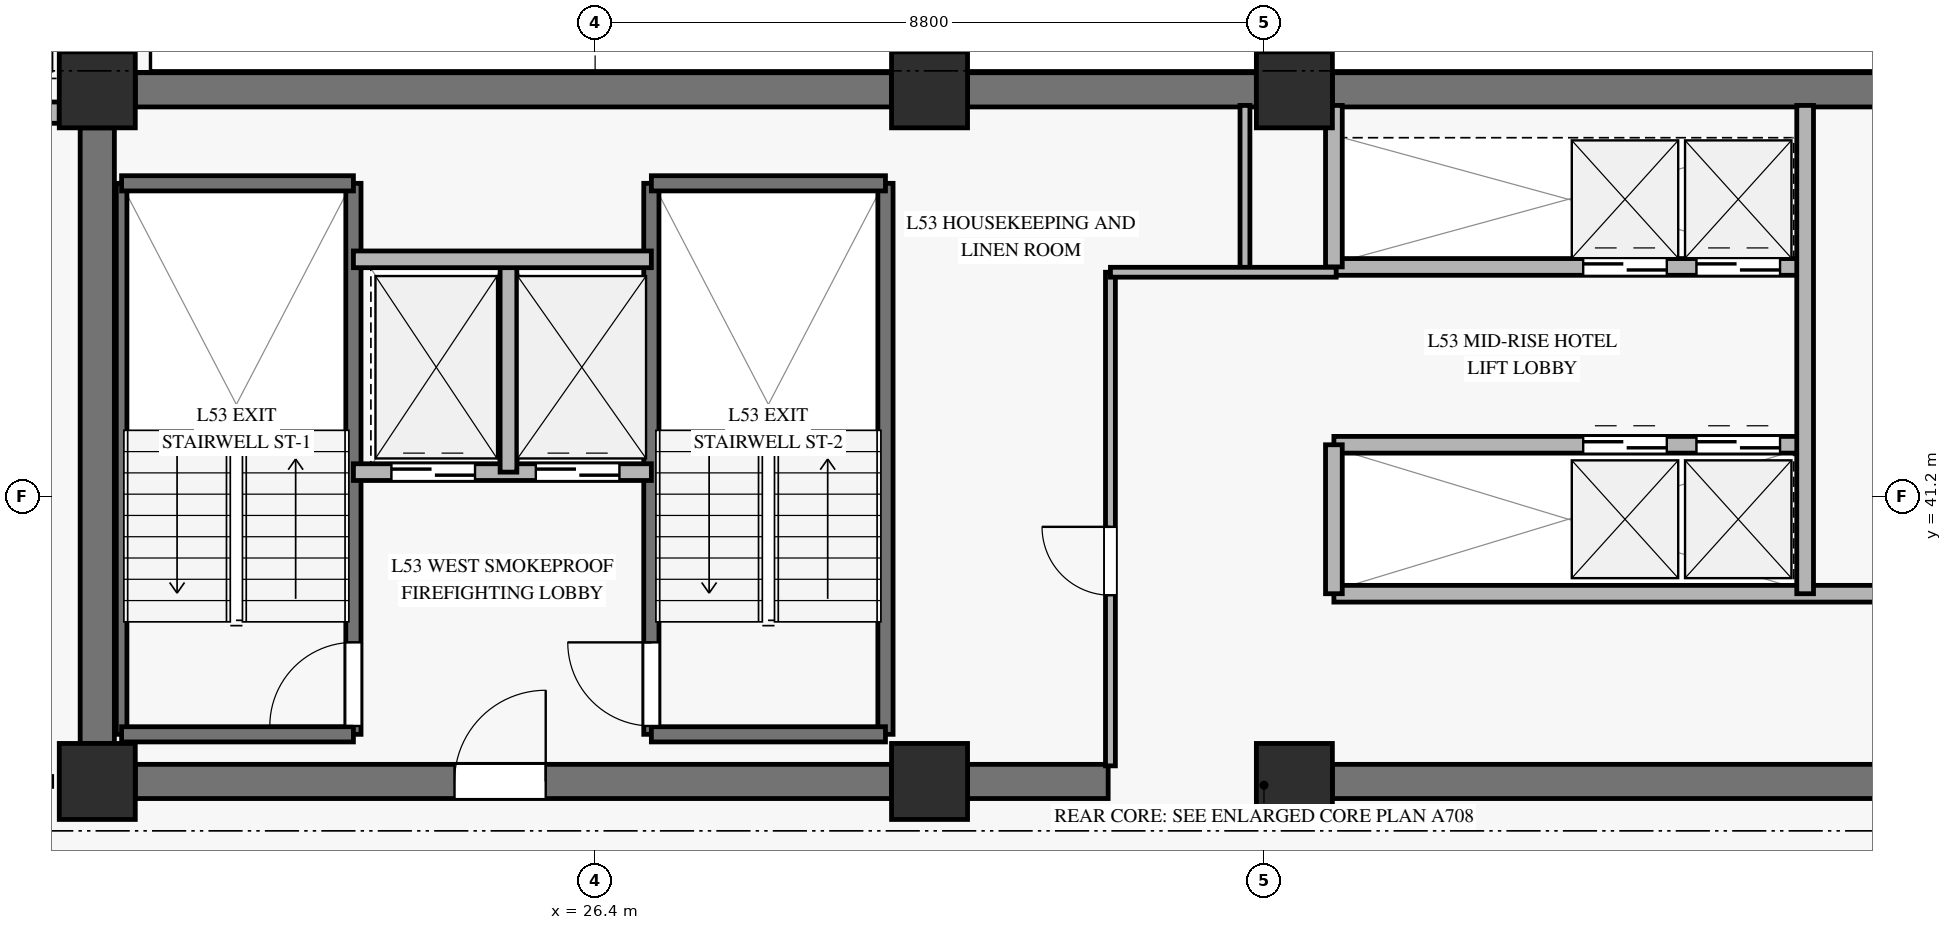
"""IFC4 building model, lengths in metres.
Left out: names, types, materials, properties, quantities, classifications, styles, units other than length and angle.
Written with IfcOpenShell. Run it as: python <this file> out.ifc"""

import sys

from ifc_helpers import new_model, si_unit, direction, frame, frame_2d, origin, origin_2d, place, context, subcontext, project, spatial, rectangle, extrude, source, transform, mapped, element, fill, save


model = new_model("IFC4")
c1 = context("Model", 3, precision=1e-05, world=origin(), true_north=direction((0.0, 1.0)))
c2 = subcontext(c1, "Body", "Model", "MODEL_VIEW")
j1 = project(units=[si_unit("LENGTHUNIT", "METRE"), si_unit("PLANEANGLEUNIT", "RADIAN")], contexts=[c1])
p1 = place(None, origin())
s1 = spatial("IfcSite", under=j1, at=p1, CompositionType="ELEMENT")
p2 = place(p1, origin())
s2 = spatial("IfcBuilding", under=s1, at=p2, CompositionType="ELEMENT")
p3 = place(p2, frame((0.0, 0.0, 209.7)))
s3 = spatial("IfcBuildingStorey", under=s2, at=p3, CompositionType="ELEMENT", Elevation=209.7)
m1 = source(origin(), c2, "Body", "SweptSolid", [
    extrude(rectangle(XDim=1.0, YDim=1.0, at=origin_2d()), origin(), (0.0, 0.0, 1.0), 3.27),
])
for number, where, z_axis, x_axis in (
    (1, (19.85, 37.45, 0.0), (0.0, 0.0, 1.0), (1.0, 0.0, 0.0)),
    (2, (19.85, 46.55, 0.0), (0.0, 0.0, 1.0), (1.0, 0.0, 0.0)),
    (3, (30.8, 37.45, 0.0), (0.0, 0.0, 1.0), (1.0, 0.0, 0.0)),
    (4, (30.8, 46.55, 0.0), (0.0, 0.0, 1.0), (1.0, 0.0, 0.0)),
    (5, (35.6, 37.45, 0.0), (0.0, 0.0, 1.0), (1.0, 0.0, 0.0)),
    (6, (35.6, 46.55, 0.0), (0.0, 0.0, 1.0), (1.0, 0.0, 0.0)),
):
    element("IfcColumn", number, at=place(p3, frame(where, z_axis=z_axis, x_axis=x_axis)), inside=s3, PredefinedType="PILASTER", context=c2, shape_type="MappedRepresentation", body=[
        mapped(m1, transform((0.0, 0.0, 0.0), x_axis=(1.0, 0.0, 0.0), y_axis=(0.0, 1.0, 0.0), z_axis=(0.0, 0.0, 1.0), scale=1.0)),
    ])
p4 = place(p3, frame((20.35, 46.55, 0.0), z_axis=(0.0, 0.0, 1.0), x_axis=(1.0, 0.0, 0.0)))
e7 = element("IfcWall", 7, at=p4, inside=s3, PredefinedType="SHEAR", context=c2, shape_type="SweptSolid", body=[
    extrude(rectangle(XDim=9.95, YDim=0.45, at=frame_2d((4.975, 0.0))), origin(), (0.0, 0.0, 1.0), 3.27),
])
p5 = place(p3, frame((31.3, 46.55, 0.0), z_axis=(0.0, 0.0, 1.0), x_axis=(1.0, 0.0, 0.0)))
e8 = element("IfcWall", 8, at=p5, inside=s3, PredefinedType="SHEAR", context=c2, shape_type="SweptSolid", body=[
    extrude(rectangle(XDim=3.8, YDim=0.45, at=frame_2d((1.9, 0.0))), origin(), (0.0, 0.0, 1.0), 3.27),
])
p6 = place(p3, frame((36.1, 46.55, 0.0), z_axis=(0.0, 0.0, 1.0), x_axis=(1.0, 0.0, 0.0)))
e9 = element("IfcWall", 9, at=p6, inside=s3, PredefinedType="SHEAR", context=c2, shape_type="SweptSolid", body=[
    extrude(rectangle(XDim=7.7, YDim=0.45, at=frame_2d((3.85, 0.0))), origin(), (0.0, 0.0, 1.0), 3.27),
])
p7 = place(p3, frame((20.35, 37.45, 0.0), z_axis=(0.0, 0.0, 1.0), x_axis=(1.0, 0.0, 0.0)))
e10 = element("IfcWall", 10, at=p7, inside=s3, PredefinedType="SHEAR", context=c2, shape_type="SweptSolid", body=[
    extrude(rectangle(XDim=9.95, YDim=0.45, at=frame_2d((4.975, 0.0))), origin(), (0.0, 0.0, 1.0), 3.27),
])
p8 = place(p7, frame((4.2, 0.0, 0.0)))
e11 = element("IfcOpeningElement", 11, at=p8, cuts=e10, PredefinedType="OPENING", context=c2, shape_type="SweptSolid", body=[
    extrude(rectangle(XDim=1.2, YDim=2.15, at=frame_2d((0.6, 1.075))), frame((0.0, 0.235, 0.0), z_axis=(0.0, -1.0, 0.0), x_axis=(1.0, 0.0, 0.0)), (0.0, 0.0, 1.0), 0.47),
])
p9 = place(p3, frame((31.3, 37.45, 0.0), z_axis=(0.0, 0.0, 1.0), x_axis=(1.0, 0.0, 0.0)))
e12 = element("IfcWall", 12, at=p9, inside=s3, PredefinedType="SHEAR", context=c2, shape_type="SweptSolid", body=[
    extrude(rectangle(XDim=1.85, YDim=0.45, at=frame_2d((0.925, 0.0))), origin(), (0.0, 0.0, 1.0), 3.27),
])
p10 = place(p3, frame((36.1, 37.45, 0.0), z_axis=(0.0, 0.0, 1.0), x_axis=(1.0, 0.0, 0.0)))
e13 = element("IfcWall", 13, at=p10, inside=s3, PredefinedType="SHEAR", context=c2, shape_type="SweptSolid", body=[
    extrude(rectangle(XDim=7.7, YDim=0.45, at=frame_2d((3.85, 0.0))), origin(), (0.0, 0.0, 1.0), 3.27),
])
p11 = place(p3, frame((19.85, 37.95, 0.0), z_axis=(0.0, 0.0, 1.0), x_axis=(0.0, 1.0, 0.0)))
e14 = element("IfcWall", 14, at=p11, inside=s3, PredefinedType="SHEAR", context=c2, shape_type="SweptSolid", body=[
    extrude(rectangle(XDim=8.1, YDim=0.45, at=frame_2d((4.05, 0.0))), origin(), (0.0, 0.0, 1.0), 3.27),
])
p12 = place(p3, frame((9.803, 46.25, 0.0), z_axis=(0.0, 0.0, 1.0), x_axis=(1.0, 0.0, 0.0)))
e15 = element("IfcWall", 15, at=p12, inside=s3, PredefinedType="SOLIDWALL", context=c2, shape_type="SweptSolid", body=[
    extrude(rectangle(XDim=9.547, YDim=0.28, at=frame_2d((4.773, 0.0))), origin(), (0.0, 0.0, 1.0), 2.75),
])
p13 = place(p12, frame((3.974, 0.0, 0.45)))
e16 = element("IfcOpeningElement", 16, at=p13, cuts=e15, PredefinedType="OPENING", context=c2, shape_type="SweptSolid", body=[
    extrude(rectangle(XDim=1.6, YDim=2.0, at=frame_2d((0.8, 1.0))), frame((0.0, 0.15, 0.0), z_axis=(0.0, -1.0, 0.0), x_axis=(1.0, 0.0, 0.0)), (0.0, 0.0, 1.0), 0.3),
])
p14 = place(p3, frame((20.17, 38.07, 0.0), z_axis=(0.0, 0.0, 1.0), x_axis=(0.0, 1.0, 0.0)))
e17 = element("IfcWall", 17, at=p14, inside=s3, PredefinedType="SOLIDWALL", context=c2, shape_type="SweptSolid", body=[
    extrude(rectangle(XDim=7.25, YDim=0.14, at=frame_2d((3.625, 0.0))), origin(), (0.0, 0.0, 1.0), 3.5),
])
p15 = place(p3, frame((23.22, 38.07, 0.0), z_axis=(0.0, 0.0, 1.0), x_axis=(0.0, 1.0, 0.0)))
e18 = element("IfcWall", 18, at=p15, inside=s3, PredefinedType="SOLIDWALL", context=c2, shape_type="SweptSolid", body=[
    extrude(rectangle(XDim=7.25, YDim=0.2, at=frame_2d((3.625, 0.0))), origin(), (0.0, 0.0, 1.0), 3.5),
])
p16 = place(p15, frame((0.11, 0.0, 0.0)))
e19 = element("IfcOpeningElement", 19, at=p16, cuts=e18, PredefinedType="OPENING", context=c2, shape_type="SweptSolid", body=[
    extrude(rectangle(XDim=1.1, YDim=2.15, at=frame_2d((0.55, 1.075))), frame((0.0, 0.11, 0.0), z_axis=(0.0, -1.0, 0.0), x_axis=(1.0, 0.0, 0.0)), (0.0, 0.0, 1.0), 0.22),
])
for number, where, z_axis, x_axis in (
    (20, (20.17, 45.32, 0.0), (0.0, 0.0, 1.0), (1.0, 0.0, 0.0)),
    (21, (20.17, 38.07, 0.0), (0.0, 0.0, 1.0), (1.0, 0.0, 0.0)),
):
    element("IfcWall", number, at=place(p3, frame(where, z_axis=z_axis, x_axis=x_axis)), inside=s3, PredefinedType="SOLIDWALL", context=c2, shape_type="SweptSolid", body=[
        extrude(rectangle(XDim=3.05, YDim=0.2, at=frame_2d((1.525, 0.0))), origin(), (0.0, 0.0, 1.0), 3.5),
    ])
p17 = place(p3, frame((27.14, 38.07, 0.0), z_axis=(0.0, 0.0, 1.0), x_axis=(0.0, 1.0, 0.0)))
e22 = element("IfcWall", 22, at=p17, inside=s3, PredefinedType="SOLIDWALL", context=c2, shape_type="SweptSolid", body=[
    extrude(rectangle(XDim=7.25, YDim=0.2, at=frame_2d((3.625, 0.0))), origin(), (0.0, 0.0, 1.0), 3.5),
])
p18 = place(p17, frame((0.11, 0.0, 0.0)))
e23 = element("IfcOpeningElement", 23, at=p18, cuts=e22, PredefinedType="OPENING", context=c2, shape_type="SweptSolid", body=[
    extrude(rectangle(XDim=1.1, YDim=2.15, at=frame_2d((0.55, 1.075))), frame((0.0, 0.11, 0.0), z_axis=(0.0, -1.0, 0.0), x_axis=(1.0, 0.0, 0.0)), (0.0, 0.0, 1.0), 0.22),
])
p19 = place(p3, frame((30.22, 38.07, 0.0), z_axis=(0.0, 0.0, 1.0), x_axis=(0.0, 1.0, 0.0)))
e24 = element("IfcWall", 24, at=p19, inside=s3, PredefinedType="SOLIDWALL", context=c2, shape_type="SweptSolid", body=[
    extrude(rectangle(XDim=7.25, YDim=0.2, at=frame_2d((3.625, 0.0))), origin(), (0.0, 0.0, 1.0), 3.5),
])
for number, where, z_axis, x_axis in (
    (25, (27.14, 45.32, 0.0), (0.0, 0.0, 1.0), (1.0, 0.0, 0.0)),
    (26, (27.14, 38.07, 0.0), (0.0, 0.0, 1.0), (1.0, 0.0, 0.0)),
):
    element("IfcWall", number, at=place(p3, frame(where, z_axis=z_axis, x_axis=x_axis)), inside=s3, PredefinedType="SOLIDWALL", context=c2, shape_type="SweptSolid", body=[
        extrude(rectangle(XDim=3.08, YDim=0.2, at=frame_2d((1.54, 0.0))), origin(), (0.0, 0.0, 1.0), 3.5),
    ])
p20 = place(p3, frame((23.22, 41.52, 0.0), z_axis=(0.0, 0.0, 1.0), x_axis=(1.0, 0.0, 0.0)))
e27 = element("IfcWall", 27, at=p20, inside=s3, PredefinedType="SOLIDWALL", context=c2, shape_type="SweptSolid", body=[
    extrude(rectangle(XDim=3.92, YDim=0.22, at=frame_2d((1.96, 0.0))), origin(), (0.0, 0.0, 1.0), 3.27),
])
p21 = place(p20, frame((0.5, 0.0, 0.0)))
e28 = element("IfcOpeningElement", 28, at=p21, cuts=e27, PredefinedType="OPENING", context=c2, shape_type="SweptSolid", body=[
    extrude(rectangle(XDim=1.1, YDim=2.2, at=frame_2d((0.55, 1.1))), frame((0.0, 0.12, 0.0), z_axis=(0.0, -1.0, 0.0), x_axis=(1.0, 0.0, 0.0)), (0.0, 0.0, 1.0), 0.24),
])
p22 = place(p20, frame((2.4, 0.0, 0.0)))
e29 = element("IfcOpeningElement", 29, at=p22, cuts=e27, PredefinedType="OPENING", context=c2, shape_type="SweptSolid", body=[
    extrude(rectangle(XDim=1.1, YDim=2.2, at=frame_2d((0.55, 1.1))), frame((0.0, 0.12, 0.0), z_axis=(0.0, -1.0, 0.0), x_axis=(1.0, 0.0, 0.0)), (0.0, 0.0, 1.0), 0.24),
])
p23 = place(p3, frame((25.26, 41.52, 0.0), z_axis=(0.0, 0.0, 1.0), x_axis=(0.0, 1.0, 0.0)))
e30 = element("IfcWall", 30, at=p23, inside=s3, PredefinedType="SOLIDWALL", context=c2, shape_type="SweptSolid", body=[
    extrude(rectangle(XDim=2.8, YDim=0.22, at=frame_2d((1.4, 0.0))), origin(), (0.0, 0.0, 1.0), 3.27),
])
p24 = place(p3, frame((23.22, 44.32, 0.0), z_axis=(0.0, 0.0, 1.0), x_axis=(1.0, 0.0, 0.0)))
e31 = element("IfcWall", 31, at=p24, inside=s3, PredefinedType="SOLIDWALL", context=c2, shape_type="SweptSolid", body=[
    extrude(rectangle(XDim=3.92, YDim=0.22, at=frame_2d((1.96, 0.0))), origin(), (0.0, 0.0, 1.0), 3.27),
])
p25 = place(p3, frame((36.12, 44.22, 0.0), z_axis=(0.0, 0.0, 1.0), x_axis=(1.0, 0.0, 0.0)))
e32 = element("IfcWall", 32, at=p25, inside=s3, PredefinedType="SOLIDWALL", context=c2, shape_type="SweptSolid", body=[
    extrude(rectangle(XDim=6.2, YDim=0.22, at=frame_2d((3.1, 0.0))), origin(), (0.0, 0.0, 1.0), 3.27),
])
p26 = place(p25, frame((3.28, 0.0, 0.0)))
e33 = element("IfcOpeningElement", 33, at=p26, cuts=e32, PredefinedType="OPENING", context=c2, shape_type="SweptSolid", body=[
    extrude(rectangle(XDim=1.1, YDim=2.2, at=frame_2d((0.55, 1.1))), frame((0.0, 0.12, 0.0), z_axis=(0.0, -1.0, 0.0), x_axis=(1.0, 0.0, 0.0)), (0.0, 0.0, 1.0), 0.24),
])
p27 = place(p25, frame((4.77, 0.0, 0.0)))
e34 = element("IfcOpeningElement", 34, at=p27, cuts=e32, PredefinedType="OPENING", context=c2, shape_type="SweptSolid", body=[
    extrude(rectangle(XDim=1.1, YDim=2.2, at=frame_2d((0.55, 1.1))), frame((0.0, 0.12, 0.0), z_axis=(0.0, -1.0, 0.0), x_axis=(1.0, 0.0, 0.0)), (0.0, 0.0, 1.0), 0.24),
])
p28 = place(p3, frame((36.12, 41.88, 0.0), z_axis=(0.0, 0.0, 1.0), x_axis=(1.0, 0.0, 0.0)))
e35 = element("IfcWall", 35, at=p28, inside=s3, PredefinedType="SOLIDWALL", context=c2, shape_type="SweptSolid", body=[
    extrude(rectangle(XDim=6.2, YDim=0.22, at=frame_2d((3.1, 0.0))), origin(), (0.0, 0.0, 1.0), 3.27),
])
p29 = place(p28, frame((3.28, 0.0, 0.0)))
e36 = element("IfcOpeningElement", 36, at=p29, cuts=e35, PredefinedType="OPENING", context=c2, shape_type="SweptSolid", body=[
    extrude(rectangle(XDim=1.1, YDim=2.2, at=frame_2d((0.55, 1.1))), frame((0.0, 0.12, 0.0), z_axis=(0.0, -1.0, 0.0), x_axis=(1.0, 0.0, 0.0)), (0.0, 0.0, 1.0), 0.24),
])
p30 = place(p28, frame((4.77, 0.0, 0.0)))
e37 = element("IfcOpeningElement", 37, at=p30, cuts=e35, PredefinedType="OPENING", context=c2, shape_type="SweptSolid", body=[
    extrude(rectangle(XDim=1.1, YDim=2.2, at=frame_2d((0.55, 1.1))), frame((0.0, 0.12, 0.0), z_axis=(0.0, -1.0, 0.0), x_axis=(1.0, 0.0, 0.0)), (0.0, 0.0, 1.0), 0.24),
])
p31 = place(p3, frame((36.12, 39.92, 0.0), z_axis=(0.0, 0.0, 1.0), x_axis=(1.0, 0.0, 0.0)))
e38 = element("IfcWall", 38, at=p31, inside=s3, PredefinedType="SOLIDWALL", context=c2, shape_type="SweptSolid", body=[
    extrude(rectangle(XDim=8.6, YDim=0.22, at=frame_2d((4.3, 0.0))), origin(), (0.0, 0.0, 1.0), 2.555),
])
p32 = place(p3, frame((42.32, 39.92, 0.0), z_axis=(0.0, 0.0, 1.0), x_axis=(0.0, 1.0, 0.0)))
e39 = element("IfcWall", 39, at=p32, inside=s3, PredefinedType="SOLIDWALL", context=c2, shape_type="SweptSolid", body=[
    extrude(rectangle(XDim=6.425, YDim=0.22, at=frame_2d((3.212, 0.0))), origin(), (0.0, 0.0, 1.0), 3.27),
])
p33 = place(p3, frame((36.12, 39.92, 0.0), z_axis=(0.0, 0.0, 1.0), x_axis=(0.0, 1.0, 0.0)))
e40 = element("IfcWall", 40, at=p33, inside=s3, PredefinedType="SOLIDWALL", context=c2, shape_type="SweptSolid", body=[
    extrude(rectangle(XDim=1.96, YDim=0.22, at=frame_2d((0.98, 0.0))), origin(), (0.0, 0.0, 1.0), 3.27),
])
p34 = place(p3, frame((36.12, 44.22, 0.0), z_axis=(0.0, 0.0, 1.0), x_axis=(0.0, 1.0, 0.0)))
e41 = element("IfcWall", 41, at=p34, inside=s3, PredefinedType="SOLIDWALL", context=c2, shape_type="SweptSolid", body=[
    extrude(rectangle(XDim=2.125, YDim=0.22, at=frame_2d((1.062, 0.0))), origin(), (0.0, 0.0, 1.0), 3.27),
])
p35 = place(p3, frame((33.18, 37.655, 0.0), z_axis=(0.0, 0.0, 1.0), x_axis=(0.0, 1.0, 0.0)))
e42 = element("IfcWall", 42, at=p35, inside=s3, PredefinedType="PARTITIONING", context=c2, shape_type="SweptSolid", body=[
    extrude(rectangle(XDim=6.495, YDim=0.13, at=frame_2d((3.248, 0.0))), origin(), (0.0, 0.0, 1.0), 2.355),
])
p36 = place(p35, frame((2.245, 0.0, 0.0)))
e43 = element("IfcOpeningElement", 43, at=p36, cuts=e42, PredefinedType="OPENING", context=c2, shape_type="SweptSolid", body=[
    extrude(rectangle(XDim=0.9, YDim=2.1, at=frame_2d((0.45, 1.05))), frame((0.0, 0.075, 0.0), z_axis=(0.0, -1.0, 0.0), x_axis=(1.0, 0.0, 0.0)), (0.0, 0.0, 1.0), 0.15),
])
p37 = place(p3, frame((34.95, 44.15, 0.0), z_axis=(0.0, 0.0, 1.0), x_axis=(0.0, 1.0, 0.0)))
e44 = element("IfcWall", 44, at=p37, inside=s3, PredefinedType="PARTITIONING", context=c2, shape_type="SweptSolid", body=[
    extrude(rectangle(XDim=2.195, YDim=0.13, at=frame_2d((1.098, 0.0))), origin(), (0.0, 0.0, 1.0), 3.27),
])
p38 = place(p3, frame((33.18, 44.15, 0.0), z_axis=(0.0, 0.0, 1.0), x_axis=(1.0, 0.0, 0.0)))
e45 = element("IfcWall", 45, at=p38, inside=s3, PredefinedType="PARTITIONING", context=c2, shape_type="SweptSolid", body=[
    extrude(rectangle(XDim=2.97, YDim=0.13, at=frame_2d((1.485, 0.0))), origin(), (0.0, 0.0, 1.0), 2.555),
])
m2 = source(origin(), c2, "Body", "SweptSolid", [
    extrude(rectangle(XDim=1.1, YDim=2.15, at=frame_2d((0.55, 1.075))), frame((0.0, 0.025, 0.0), z_axis=(0.0, -1.0, 0.0), x_axis=(1.0, 0.0, 0.0)), (0.0, 0.0, 1.0), 0.05),
])
p39 = place(p16, origin())
e46 = element("IfcDoor", 46, at=p39, inside=s3, OperationType="SINGLE_SWING_LEFT", PredefinedType="DOOR", context=c2, shape_type="MappedRepresentation", body=[
    mapped(m2, transform((0.0, 0.0, 0.0), x_axis=(1.0, 0.0, 0.0), y_axis=(0.0, 1.0, 0.0), z_axis=(0.0, 0.0, 1.0), scale=1.0)),
])
fill(e19, e46)
p40 = place(p18, origin())
e47 = element("IfcDoor", 47, at=p40, inside=s3, OperationType="SINGLE_SWING_RIGHT", PredefinedType="DOOR", context=c2, shape_type="MappedRepresentation", body=[
    mapped(m2, transform((0.0, 0.0, 0.0), x_axis=(1.0, 0.0, 0.0), y_axis=(0.0, 1.0, 0.0), z_axis=(0.0, 0.0, 1.0), scale=1.0)),
])
fill(e23, e47)
m3 = source(origin(), c2, "Body", "SweptSolid", [
    extrude(rectangle(XDim=1.1, YDim=2.2, at=frame_2d((0.55, 1.1))), frame((0.0, 0.025, 0.0), z_axis=(0.0, -1.0, 0.0), x_axis=(1.0, 0.0, 0.0)), (0.0, 0.0, 1.0), 0.05),
])
p41 = place(p21, origin())
e48 = element("IfcDoor", 48, at=p41, inside=s3, OperationType="SLIDING_TO_LEFT", PredefinedType="DOOR", context=c2, shape_type="MappedRepresentation", body=[
    mapped(m3, transform((0.0, 0.0, 0.0), x_axis=(1.0, 0.0, 0.0), y_axis=(0.0, 1.0, 0.0), z_axis=(0.0, 0.0, 1.0), scale=1.0)),
])
fill(e28, e48)
p42 = place(p22, origin())
e49 = element("IfcDoor", 49, at=p42, inside=s3, OperationType="SLIDING_TO_LEFT", PredefinedType="DOOR", context=c2, shape_type="MappedRepresentation", body=[
    mapped(m3, transform((0.0, 0.0, 0.0), x_axis=(1.0, 0.0, 0.0), y_axis=(0.0, 1.0, 0.0), z_axis=(0.0, 0.0, 1.0), scale=1.0)),
])
fill(e29, e49)
m4 = source(origin(), c2, "Body", "SweptSolid", [
    extrude(rectangle(XDim=1.2, YDim=2.15, at=frame_2d((0.6, 1.075))), frame((0.0, 0.025, 0.0), z_axis=(0.0, -1.0, 0.0), x_axis=(1.0, 0.0, 0.0)), (0.0, 0.0, 1.0), 0.05),
])
p43 = place(p8, origin())
e50 = element("IfcDoor", 50, at=p43, inside=s3, OperationType="SINGLE_SWING_RIGHT", PredefinedType="DOOR", context=c2, shape_type="MappedRepresentation", body=[
    mapped(m4, transform((0.0, 0.0, 0.0), x_axis=(1.0, 0.0, 0.0), y_axis=(0.0, 1.0, 0.0), z_axis=(0.0, 0.0, 1.0), scale=1.0)),
])
fill(e11, e50)
p44 = place(p26, origin())
e51 = element("IfcDoor", 51, at=p44, inside=s3, OperationType="SLIDING_TO_LEFT", PredefinedType="DOOR", context=c2, shape_type="MappedRepresentation", body=[
    mapped(m3, transform((0.0, 0.0, 0.0), x_axis=(1.0, 0.0, 0.0), y_axis=(0.0, 1.0, 0.0), z_axis=(0.0, 0.0, 1.0), scale=1.0)),
])
fill(e33, e51)
p45 = place(p27, origin())
e52 = element("IfcDoor", 52, at=p45, inside=s3, OperationType="SLIDING_TO_LEFT", PredefinedType="DOOR", context=c2, shape_type="MappedRepresentation", body=[
    mapped(m3, transform((0.0, 0.0, 0.0), x_axis=(1.0, 0.0, 0.0), y_axis=(0.0, 1.0, 0.0), z_axis=(0.0, 0.0, 1.0), scale=1.0)),
])
fill(e34, e52)
p46 = place(p29, origin())
e53 = element("IfcDoor", 53, at=p46, inside=s3, OperationType="SLIDING_TO_LEFT", PredefinedType="DOOR", context=c2, shape_type="MappedRepresentation", body=[
    mapped(m3, transform((0.0, 0.0, 0.0), x_axis=(1.0, 0.0, 0.0), y_axis=(0.0, 1.0, 0.0), z_axis=(0.0, 0.0, 1.0), scale=1.0)),
])
fill(e36, e53)
p47 = place(p30, origin())
e54 = element("IfcDoor", 54, at=p47, inside=s3, OperationType="SLIDING_TO_LEFT", PredefinedType="DOOR", context=c2, shape_type="MappedRepresentation", body=[
    mapped(m3, transform((0.0, 0.0, 0.0), x_axis=(1.0, 0.0, 0.0), y_axis=(0.0, 1.0, 0.0), z_axis=(0.0, 0.0, 1.0), scale=1.0)),
])
fill(e37, e54)
m5 = source(origin(), c2, "Body", "SweptSolid", [
    extrude(rectangle(XDim=0.9, YDim=2.1, at=frame_2d((0.45, 1.05))), frame((0.0, 0.025, 0.0), z_axis=(0.0, -1.0, 0.0), x_axis=(1.0, 0.0, 0.0)), (0.0, 0.0, 1.0), 0.05),
])
p48 = place(p36, origin())
e55 = element("IfcDoor", 55, at=p48, inside=s3, OperationType="SINGLE_SWING_RIGHT", PredefinedType="DOOR", context=c2, shape_type="MappedRepresentation", body=[
    mapped(m5, transform((0.0, 0.0, 0.0), x_axis=(1.0, 0.0, 0.0), y_axis=(0.0, 1.0, 0.0), z_axis=(0.0, 0.0, 1.0), scale=1.0)),
])
fill(e43, e55)
save(model, sys.argv[1])
